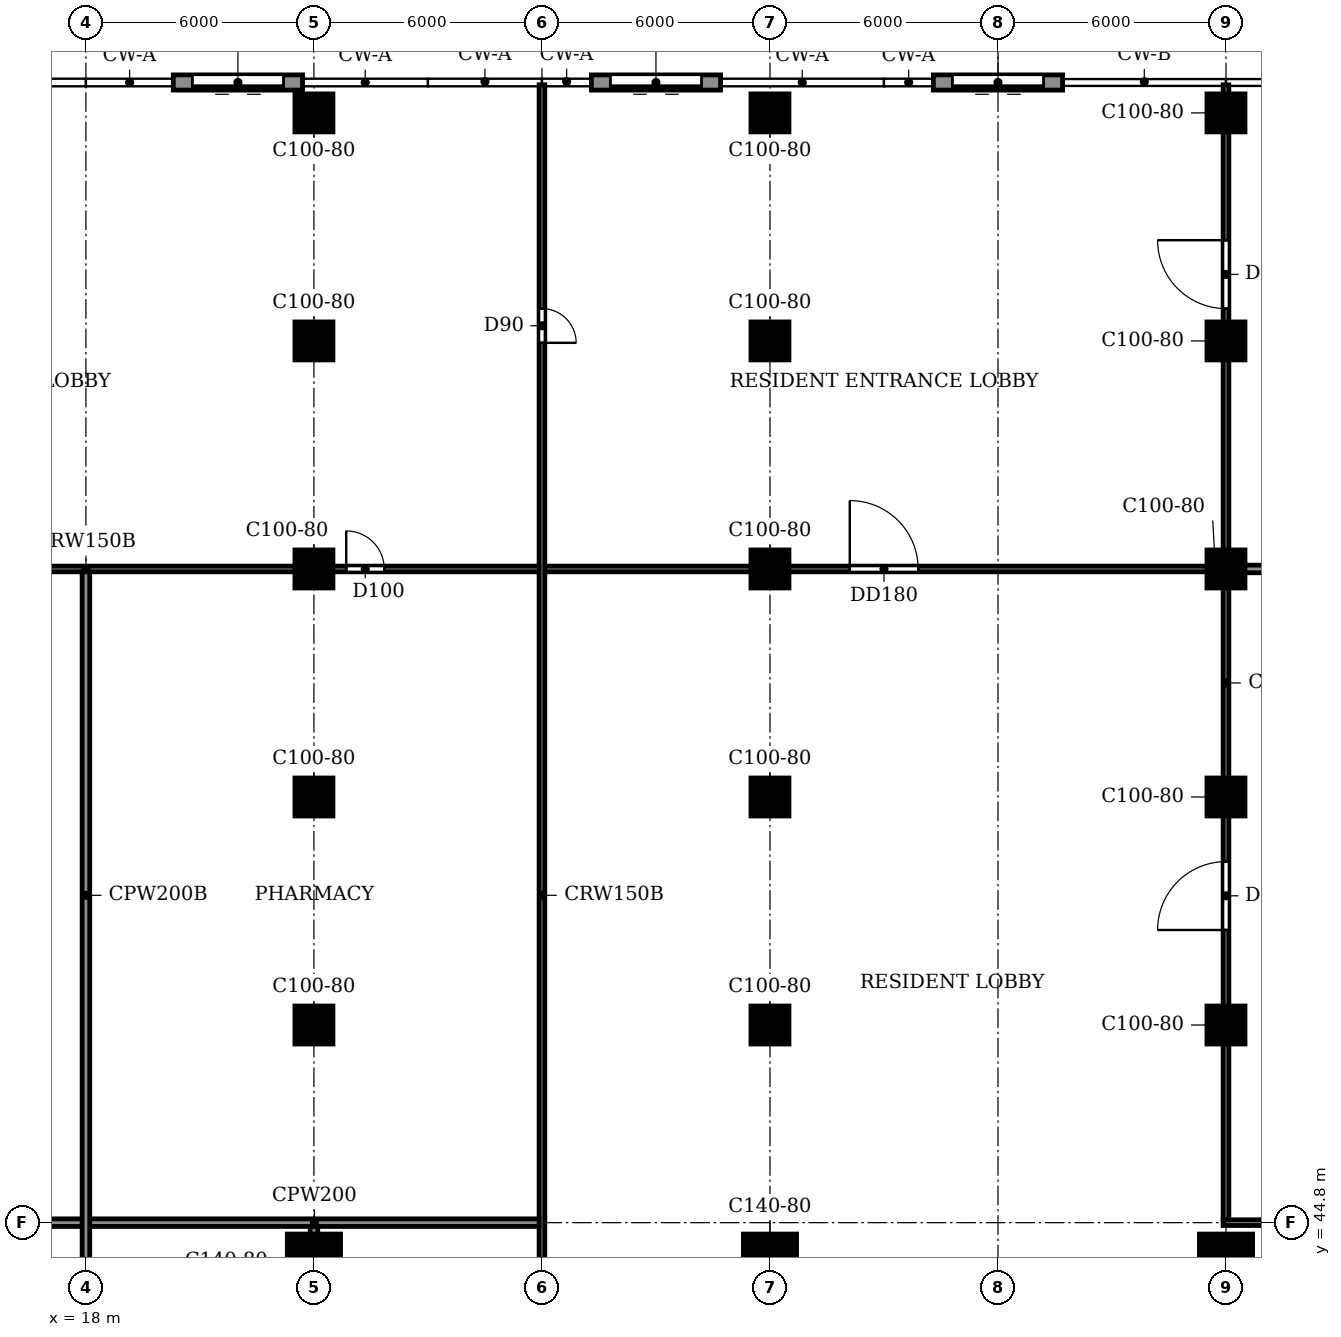
"""IFC4 building model, lengths in metres.
Left out: names, types, materials, properties, quantities, classifications, styles, units other than length and angle.
Written with IfcOpenShell. Run it as: python <this file> out.ifc"""

import sys

from ifc_helpers import new_model, si_unit, direction, frame, frame_2d, origin, origin_2d, place, context, subcontext, project, spatial, rectangle, extrude, source, transform, mapped, element, fill, save


model = new_model("IFC4")
c1 = context("Model", 3, precision=1e-05, world=origin(), true_north=direction((0.0, 1.0)))
c2 = subcontext(c1, "Body", "Model", "MODEL_VIEW")
j1 = project(units=[si_unit("LENGTHUNIT", "METRE"), si_unit("PLANEANGLEUNIT", "RADIAN")], contexts=[c1])
p1 = place(None, origin())
s1 = spatial("IfcSite", under=j1, at=p1, CompositionType="ELEMENT")
p2 = place(p1, origin())
s2 = spatial("IfcBuilding", under=s1, at=p2, CompositionType="ELEMENT")
p3 = place(p2, origin())
s3 = spatial("IfcBuildingStorey", under=s2, at=p3, CompositionType="ELEMENT", Elevation=0.0)
m1 = source(origin(), c2, "Body", "SweptSolid", [
    extrude(rectangle(XDim=1.4, YDim=1.4, at=origin_2d()), origin(), (0.0, 0.0, 1.0), 4.5),
])
for number, where, z_axis, x_axis in (
    (1, (24.0, 43.8, -0.3), (0.0, 0.0, 1.0), (1.0, 0.0, 0.0)),
    (2, (36.0, 43.8, -0.3), (0.0, 0.0, 1.0), (1.0, 0.0, 0.0)),
    (3, (48.0, 43.8, -0.3), (0.0, 0.0, 1.0), (1.0, 0.0, 0.0)),
):
    element("IfcColumn", number, at=place(p3, frame(where, z_axis=z_axis, x_axis=x_axis)), inside=s3, PredefinedType="COLUMN", context=c2, shape_type="MappedRepresentation", body=[
        mapped(m1, transform((0.0, 0.0, 0.0))),
    ])
m2 = source(origin(), c2, "Body", "SweptSolid", [
    extrude(rectangle(XDim=1.0, YDim=1.0, at=origin_2d()), origin(), (0.0, 0.0, 1.0), 5.98),
])
for number, where, z_axis, x_axis in (
    (4, (24.0, 74.0, -0.3), (0.0, 0.0, 1.0), (1.0, 0.0, 0.0)),
    (5, (36.0, 74.0, -0.3), (0.0, 0.0, 1.0), (1.0, 0.0, 0.0)),
    (6, (48.0, 74.0, -0.3), (0.0, 0.0, 1.0), (1.0, 0.0, 0.0)),
    (7, (24.0, 68.0, -0.3), (0.0, 0.0, 1.0), (1.0, 0.0, 0.0)),
    (8, (36.0, 68.0, -0.3), (0.0, 0.0, 1.0), (1.0, 0.0, 0.0)),
    (9, (48.0, 68.0, -0.3), (0.0, 0.0, 1.0), (1.0, 0.0, 0.0)),
    (10, (24.0, 62.0, -0.3), (0.0, 0.0, 1.0), (1.0, 0.0, 0.0)),
    (11, (36.0, 62.0, -0.3), (0.0, 0.0, 1.0), (1.0, 0.0, 0.0)),
    (12, (48.0, 62.0, -0.3), (0.0, 0.0, 1.0), (1.0, 0.0, 0.0)),
    (13, (24.0, 56.0, -0.3), (0.0, 0.0, 1.0), (1.0, 0.0, 0.0)),
    (14, (36.0, 56.0, -0.3), (0.0, 0.0, 1.0), (1.0, 0.0, 0.0)),
    (15, (48.0, 56.0, -0.3), (0.0, 0.0, 1.0), (1.0, 0.0, 0.0)),
    (16, (24.0, 50.0, -0.3), (0.0, 0.0, 1.0), (1.0, 0.0, 0.0)),
    (17, (36.0, 50.0, -0.3), (0.0, 0.0, 1.0), (1.0, 0.0, 0.0)),
    (18, (48.0, 50.0, -0.3), (0.0, 0.0, 1.0), (1.0, 0.0, 0.0)),
):
    element("IfcColumn", number, at=place(p3, frame(where, z_axis=z_axis, x_axis=x_axis)), inside=s3, PredefinedType="COLUMN", context=c2, shape_type="MappedRepresentation", body=[
        mapped(m2, transform((0.0, 0.0, 0.0))),
    ])
p4 = place(p3, frame((43.7, 74.8, 0.0), z_axis=(0.0, 0.0, 1.0), x_axis=(-1.0, 0.0, 0.0)))
e19 = element("IfcWall", 19, at=p4, inside=s3, PredefinedType="STANDARD", context=c2, shape_type="SweptSolid", body=[
    extrude(rectangle(XDim=3.4, YDim=0.4, at=frame_2d((1.7, 0.0))), origin(), (0.0, 0.0, 1.0), 5.68),
])
p5 = place(p4, frame((0.5, 0.0, 0.0)))
e20 = element("IfcOpeningElement", 20, at=p5, cuts=e19, PredefinedType="OPENING", context=c2, shape_type="SweptSolid", body=[
    extrude(rectangle(XDim=2.4, YDim=2.4, at=frame_2d((1.2, 1.2))), frame((0.0, 0.21, 0.0), z_axis=(0.0, -1.0, 0.0), x_axis=(1.0, 0.0, 0.0)), (0.0, 0.0, 1.0), 0.42),
])
p6 = place(p3, frame((34.7, 74.8, 0.0), z_axis=(0.0, 0.0, 1.0), x_axis=(-1.0, 0.0, 0.0)))
e21 = element("IfcWall", 21, at=p6, inside=s3, PredefinedType="STANDARD", context=c2, shape_type="SweptSolid", body=[
    extrude(rectangle(XDim=3.4, YDim=0.4, at=frame_2d((1.7, 0.0))), origin(), (0.0, 0.0, 1.0), 5.68),
])
p7 = place(p6, frame((0.5, 0.0, 0.0)))
e22 = element("IfcOpeningElement", 22, at=p7, cuts=e21, PredefinedType="OPENING", context=c2, shape_type="SweptSolid", body=[
    extrude(rectangle(XDim=2.4, YDim=2.4, at=frame_2d((1.2, 1.2))), frame((0.0, 0.21, 0.0), z_axis=(0.0, -1.0, 0.0), x_axis=(1.0, 0.0, 0.0)), (0.0, 0.0, 1.0), 0.42),
])
p8 = place(p3, frame((23.7, 74.8, 0.0), z_axis=(0.0, 0.0, 1.0), x_axis=(-1.0, 0.0, 0.0)))
e23 = element("IfcWall", 23, at=p8, inside=s3, PredefinedType="STANDARD", context=c2, shape_type="SweptSolid", body=[
    extrude(rectangle(XDim=3.4, YDim=0.4, at=frame_2d((1.7, 0.0))), origin(), (0.0, 0.0, 1.0), 5.68),
])
p9 = place(p8, frame((0.5, 0.0, 0.0)))
e24 = element("IfcOpeningElement", 24, at=p9, cuts=e23, PredefinedType="OPENING", context=c2, shape_type="SweptSolid", body=[
    extrude(rectangle(XDim=2.4, YDim=2.4, at=frame_2d((1.2, 1.2))), frame((0.0, 0.21, 0.0), z_axis=(0.0, -1.0, 0.0), x_axis=(1.0, 0.0, 0.0)), (0.0, 0.0, 1.0), 0.42),
])
p10 = place(p3, frame((47.925, 44.8, 0.0), z_axis=(0.0, 0.0, 1.0), x_axis=(1.0, 0.0, 0.0)))
e25 = element("IfcWall", 25, at=p10, inside=s3, PredefinedType="PARTITIONING", context=c2, shape_type="SweptSolid", body=[
    extrude(rectangle(XDim=6.15, YDim=0.15, at=frame_2d((3.075, 0.0))), origin(), (0.0, 0.0, 1.0), 4.2),
])
p11 = place(p3, frame((-2.74, 62.0, 0.0), z_axis=(0.0, 0.0, 1.0), x_axis=(1.0, 0.0, 0.0)))
e26 = element("IfcWall", 26, at=p11, inside=s3, PredefinedType="PARTITIONING", context=c2, shape_type="SweptSolid", body=[
    extrude(rectangle(XDim=50.665, YDim=0.15, at=frame_2d((25.333, 0.0))), origin(), (0.0, 0.0, 1.0), 5.68),
])
p12 = place(p11, frame((9.44, 0.0, 0.0)))
e27 = element("IfcOpeningElement", 27, at=p12, cuts=e26, PredefinedType="OPENING", context=c2, shape_type="SweptSolid", body=[
    extrude(rectangle(XDim=1.8, YDim=2.1, at=frame_2d((0.9, 1.05))), frame((0.0, 0.085, 0.0), z_axis=(0.0, -1.0, 0.0), x_axis=(1.0, 0.0, 0.0)), (0.0, 0.0, 1.0), 0.17),
])
p13 = place(p11, frame((27.59, 0.0, 0.0)))
e28 = element("IfcOpeningElement", 28, at=p13, cuts=e26, PredefinedType="OPENING", context=c2, shape_type="SweptSolid", body=[
    extrude(rectangle(XDim=1.0, YDim=2.1, at=frame_2d((0.5, 1.05))), frame((0.0, 0.085, 0.0), z_axis=(0.0, -1.0, 0.0), x_axis=(1.0, 0.0, 0.0)), (0.0, 0.0, 1.0), 0.17),
])
p14 = place(p11, frame((40.84, 0.0, 0.0)))
e29 = element("IfcOpeningElement", 29, at=p14, cuts=e26, PredefinedType="OPENING", context=c2, shape_type="SweptSolid", body=[
    extrude(rectangle(XDim=1.8, YDim=2.1, at=frame_2d((0.9, 1.05))), frame((0.0, 0.085, 0.0), z_axis=(0.0, -1.0, 0.0), x_axis=(1.0, 0.0, 0.0)), (0.0, 0.0, 1.0), 0.17),
])
p15 = place(p3, frame((30.0, 38.1, 0.0), z_axis=(0.0, 0.0, 1.0), x_axis=(0.0, 1.0, 0.0)))
e30 = element("IfcWall", 30, at=p15, inside=s3, PredefinedType="PARTITIONING", context=c2, shape_type="SweptSolid", body=[
    extrude(rectangle(XDim=36.64, YDim=0.15, at=frame_2d((18.32, 0.0))), origin(), (0.0, 0.0, 1.0), 5.68),
])
p16 = place(p15, frame((29.85, 0.0, 0.0)))
e31 = element("IfcOpeningElement", 31, at=p16, cuts=e30, PredefinedType="OPENING", context=c2, shape_type="SweptSolid", body=[
    extrude(rectangle(XDim=0.9, YDim=2.1, at=frame_2d((0.45, 1.05))), frame((0.0, 0.085, 0.0), z_axis=(0.0, -1.0, 0.0), x_axis=(1.0, 0.0, 0.0)), (0.0, 0.0, 1.0), 0.17),
])
p17 = place(p3, frame((48.0, 44.875, 0.0), z_axis=(0.0, 0.0, 1.0), x_axis=(0.0, 1.0, 0.0)))
e32 = element("IfcWall", 32, at=p17, inside=s3, PredefinedType="PARTITIONING", context=c2, shape_type="SweptSolid", body=[
    extrude(rectangle(XDim=29.865, YDim=0.15, at=frame_2d((14.933, 0.0))), origin(), (0.0, 0.0, 1.0), 5.68),
])
p18 = place(p17, frame((23.975, 0.0, 0.0)))
e33 = element("IfcOpeningElement", 33, at=p18, cuts=e32, PredefinedType="OPENING", context=c2, shape_type="SweptSolid", body=[
    extrude(rectangle(XDim=1.8, YDim=2.1, at=frame_2d((0.9, 1.05))), frame((0.0, 0.085, 0.0), z_axis=(0.0, -1.0, 0.0), x_axis=(1.0, 0.0, 0.0)), (0.0, 0.0, 1.0), 0.17),
])
p19 = place(p17, frame((7.625, 0.0, 0.0)))
e34 = element("IfcOpeningElement", 34, at=p19, cuts=e32, PredefinedType="OPENING", context=c2, shape_type="SweptSolid", body=[
    extrude(rectangle(XDim=1.8, YDim=2.1, at=frame_2d((0.9, 1.05))), frame((0.0, 0.085, 0.0), z_axis=(0.0, -1.0, 0.0), x_axis=(1.0, 0.0, 0.0)), (0.0, 0.0, 1.0), 0.17),
])
p20 = place(p3, frame((-2.74, 44.8, 0.0), z_axis=(0.0, 0.0, 1.0), x_axis=(1.0, 0.0, 0.0)))
e35 = element("IfcWall", 35, at=p20, inside=s3, PredefinedType="PARTITIONING", context=c2, shape_type="SweptSolid", body=[
    extrude(rectangle(XDim=32.665, YDim=0.2, at=frame_2d((16.333, 0.0))), origin(), (0.0, 0.0, 1.0), 4.2),
])
p21 = place(p20, frame((9.84, 0.0, 0.0)))
e36 = element("IfcOpeningElement", 36, at=p21, cuts=e35, PredefinedType="OPENING", context=c2, shape_type="SweptSolid", body=[
    extrude(rectangle(XDim=1.0, YDim=2.1, at=frame_2d((0.5, 1.05))), frame((0.0, 0.11, 0.0), z_axis=(0.0, -1.0, 0.0), x_axis=(1.0, 0.0, 0.0)), (0.0, 0.0, 1.0), 0.22),
])
p22 = place(p3, frame((48.075, 62.0, 0.0), z_axis=(0.0, 0.0, 1.0), x_axis=(1.0, 0.0, 0.0)))
e37 = element("IfcWall", 37, at=p22, inside=s3, PredefinedType="PARTITIONING", context=c2, shape_type="SweptSolid", body=[
    extrude(rectangle(XDim=24.025, YDim=0.2, at=frame_2d((12.013, 0.0))), origin(), (0.0, 0.0, 1.0), 5.68),
])
p23 = place(p3, frame((18.0, 38.535, 0.0), z_axis=(0.0, 0.0, 1.0), x_axis=(0.0, 1.0, 0.0)))
e38 = element("IfcWall", 38, at=p23, inside=s3, PredefinedType="PARTITIONING", context=c2, shape_type="SweptSolid", body=[
    extrude(rectangle(XDim=23.39, YDim=0.2, at=frame_2d((11.695, 0.0))), origin(), (0.0, 0.0, 1.0), 5.68),
])
p24 = place(p3, frame((24.0, 30.475, 0.0), z_axis=(0.0, 0.0, 1.0), x_axis=(0.0, 1.0, 0.0)))
e39 = element("IfcWall", 39, at=p24, inside=s3, PredefinedType="PARTITIONING", context=c2, shape_type="SweptSolid", body=[
    extrude(rectangle(XDim=14.225, YDim=0.2, at=frame_2d((7.112, 0.0))), origin(), (0.0, 0.0, 1.0), 4.2),
])
p25 = place(p9, origin())
e40 = element("IfcDoor", 40, at=p25, inside=s3, OperationType="DOUBLE_DOOR_SLIDING", PredefinedType="DOOR", context=c2, shape_type="SweptSolid", body=[
    extrude(rectangle(XDim=2.4, YDim=2.4, at=frame_2d((1.2, 1.2))), frame((0.0, 0.025, 0.0), z_axis=(0.0, -1.0, 0.0), x_axis=(1.0, 0.0, 0.0)), (0.0, 0.0, 1.0), 0.05),
])
fill(e24, e40)
p26 = place(p13, origin())
e41 = element("IfcDoor", 41, at=p26, inside=s3, OperationType="SINGLE_SWING_LEFT", PredefinedType="DOOR", context=c2, shape_type="SweptSolid", body=[
    extrude(rectangle(XDim=1.0, YDim=2.1, at=frame_2d((0.5, 1.05))), frame((0.0, 0.025, 0.0), z_axis=(0.0, -1.0, 0.0), x_axis=(1.0, 0.0, 0.0)), (0.0, 0.0, 1.0), 0.05),
])
fill(e28, e41)
p27 = place(p16, frame((0.9, 0.0, 0.0), z_axis=(0.0, 0.0, 1.0), x_axis=(-1.0, 0.0, 0.0)))
e42 = element("IfcDoor", 42, at=p27, inside=s3, OperationType="SINGLE_SWING_RIGHT", PredefinedType="DOOR", context=c2, shape_type="SweptSolid", body=[
    extrude(rectangle(XDim=0.9, YDim=2.1, at=frame_2d((0.45, 1.05))), frame((0.0, 0.025, 0.0), z_axis=(0.0, -1.0, 0.0), x_axis=(1.0, 0.0, 0.0)), (0.0, 0.0, 1.0), 0.05),
])
fill(e31, e42)
p28 = place(p7, origin())
e43 = element("IfcDoor", 43, at=p28, inside=s3, OperationType="DOUBLE_DOOR_SLIDING", PredefinedType="DOOR", context=c2, shape_type="SweptSolid", body=[
    extrude(rectangle(XDim=2.4, YDim=2.4, at=frame_2d((1.2, 1.2))), frame((0.0, 0.025, 0.0), z_axis=(0.0, -1.0, 0.0), x_axis=(1.0, 0.0, 0.0)), (0.0, 0.0, 1.0), 0.05),
])
fill(e22, e43)
p29 = place(p14, origin())
e44 = element("IfcDoor", 44, at=p29, inside=s3, OperationType="DOUBLE_DOOR_SINGLE_SWING", PredefinedType="DOOR", context=c2, shape_type="SweptSolid", body=[
    extrude(rectangle(XDim=1.8, YDim=2.1, at=frame_2d((0.9, 1.05))), frame((0.0, 0.025, 0.0), z_axis=(0.0, -1.0, 0.0), x_axis=(1.0, 0.0, 0.0)), (0.0, 0.0, 1.0), 0.05),
])
fill(e29, e44)
p30 = place(p5, origin())
e45 = element("IfcDoor", 45, at=p30, inside=s3, OperationType="DOUBLE_DOOR_SLIDING", PredefinedType="DOOR", context=c2, shape_type="SweptSolid", body=[
    extrude(rectangle(XDim=2.4, YDim=2.4, at=frame_2d((1.2, 1.2))), frame((0.0, 0.025, 0.0), z_axis=(0.0, -1.0, 0.0), x_axis=(1.0, 0.0, 0.0)), (0.0, 0.0, 1.0), 0.05),
])
fill(e20, e45)
p31 = place(p18, origin())
e46 = element("IfcDoor", 46, at=p31, inside=s3, OperationType="DOUBLE_DOOR_SINGLE_SWING", PredefinedType="DOOR", context=c2, shape_type="SweptSolid", body=[
    extrude(rectangle(XDim=1.8, YDim=2.1, at=frame_2d((0.9, 1.05))), frame((0.0, 0.025, 0.0), z_axis=(0.0, -1.0, 0.0), x_axis=(1.0, 0.0, 0.0)), (0.0, 0.0, 1.0), 0.05),
])
fill(e33, e46)
p32 = place(p19, origin())
e47 = element("IfcDoor", 47, at=p32, inside=s3, OperationType="DOUBLE_DOOR_SINGLE_SWING", PredefinedType="DOOR", context=c2, shape_type="SweptSolid", body=[
    extrude(rectangle(XDim=1.8, YDim=2.1, at=frame_2d((0.9, 1.05))), frame((0.0, 0.025, 0.0), z_axis=(0.0, -1.0, 0.0), x_axis=(1.0, 0.0, 0.0)), (0.0, 0.0, 1.0), 0.05),
])
fill(e34, e47)
save(model, sys.argv[1])
